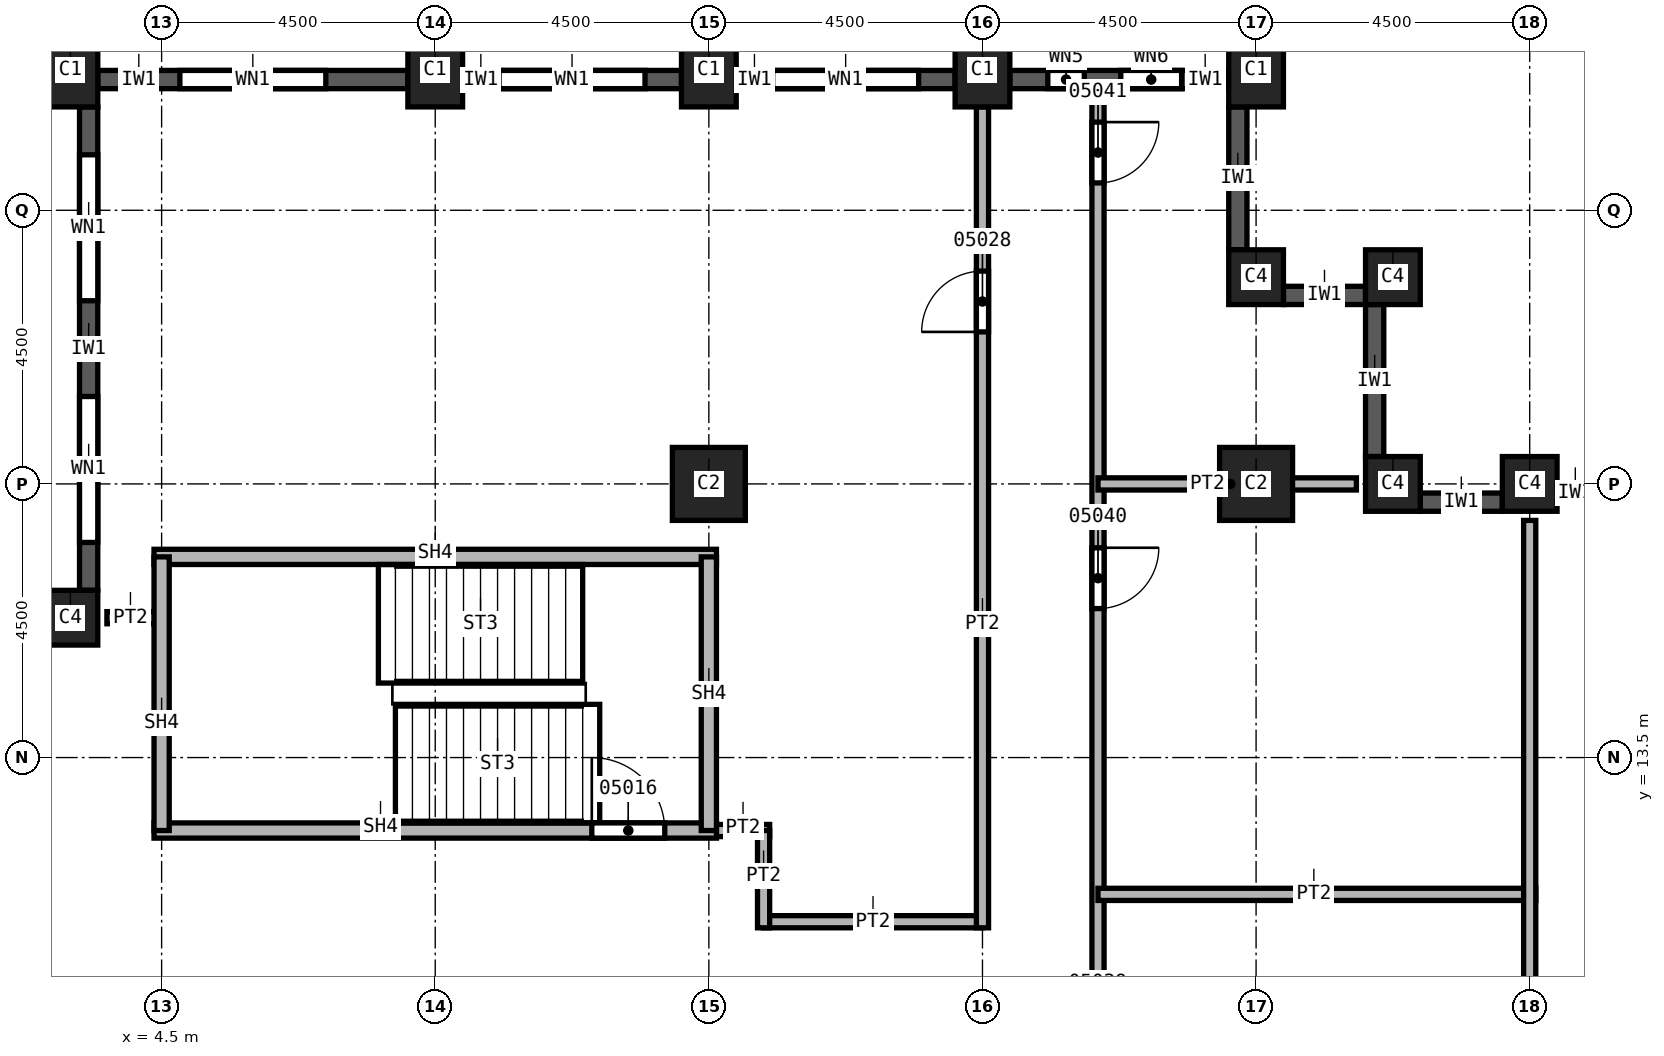
"""IFC4 building model, lengths in metres.
Left out: names, types, materials, properties, quantities, classifications, styles, units other than length and angle.
Written with IfcOpenShell. Run it as: python <this file> out.ifc"""

import sys

from ifc_helpers import new_model, si_unit, direction, frame, frame_2d, origin, origin_2d, place, context, subcontext, project, spatial, rectangle, extrude, element, fill, save


model = new_model("IFC4")
c1 = context("Model", 3, precision=1e-05, world=origin(), true_north=direction((0.0, 1.0)))
c2 = subcontext(c1, "Body", "Model", "MODEL_VIEW")
j1 = project(units=[si_unit("LENGTHUNIT", "METRE"), si_unit("PLANEANGLEUNIT", "RADIAN")], contexts=[c1])
p1 = place(None, origin())
s1 = spatial("IfcSite", under=j1, at=p1, CompositionType="ELEMENT")
p2 = place(p1, origin())
s2 = spatial("IfcBuilding", under=s1, at=p2, CompositionType="ELEMENT")
p3 = place(p2, frame((0.0, 0.0, 116.0)))
s3 = spatial("IfcBuildingStorey", under=s2, at=p3, CompositionType="ELEMENT", Elevation=116.0)
for number, where, z_axis, x_axis in (
    (1, (13.5, 18.0, 0.0), (0.0, 0.0, 1.0), (1.0, 0.0, 0.0)),
    (2, (22.5, 18.0, 0.0), (0.0, 0.0, 1.0), (1.0, 0.0, 0.0)),
):
    element("IfcColumn", number, at=place(p3, frame(where, z_axis=z_axis, x_axis=x_axis)), inside=s3, PredefinedType="COLUMN", context=c2, shape_type="SweptSolid", body=[
        extrude(rectangle(XDim=1.2, YDim=1.2, at=origin_2d()), origin(), (0.0, 0.0, 1.0), 3.6),
    ])
p4 = place(p3, frame((27.0, 18.0, 0.0), z_axis=(0.0, 0.0, 1.0), x_axis=(1.0, 0.0, 0.0)))
e3 = element("IfcColumn", 3, at=p4, inside=s3, PredefinedType="COLUMN", context=c2, shape_type="SweptSolid", body=[
    extrude(rectangle(XDim=0.9, YDim=0.9, at=origin_2d()), origin(), (0.0, 0.0, 1.0), 3.6),
])
for number, where, z_axis, x_axis in (
    (4, (3.0, 24.8, 0.0), (0.0, 0.0, 1.0), (1.0, 0.0, 0.0)),
    (5, (9.0, 24.8, 0.0), (0.0, 0.0, 1.0), (1.0, 0.0, 0.0)),
    (6, (13.5, 24.8, 0.0), (0.0, 0.0, 1.0), (1.0, 0.0, 0.0)),
    (7, (18.0, 24.8, 0.0), (0.0, 0.0, 1.0), (1.0, 0.0, 0.0)),
    (8, (22.5, 24.8, 0.0), (0.0, 0.0, 1.0), (1.0, 0.0, 0.0)),
):
    element("IfcColumn", number, at=place(p3, frame(where, z_axis=z_axis, x_axis=x_axis)), inside=s3, PredefinedType="COLUMN", context=c2, shape_type="SweptSolid", body=[
        extrude(rectangle(XDim=0.9, YDim=1.2, at=origin_2d()), origin(), (0.0, 0.0, 1.0), 3.6),
    ])
for number, where, z_axis, x_axis in (
    (9, (3.0, 15.8, 0.0), (0.0, 0.0, 1.0), (1.0, 0.0, 0.0)),
    (10, (22.5, 21.4, 0.0), (0.0, 0.0, 1.0), (1.0, 0.0, 0.0)),
    (11, (24.75, 21.4, 0.0), (0.0, 0.0, 1.0), (1.0, 0.0, 0.0)),
    (12, (24.75, 18.0, 0.0), (0.0, 0.0, 1.0), (1.0, 0.0, 0.0)),
):
    element("IfcColumn", number, at=place(p3, frame(where, z_axis=z_axis, x_axis=x_axis)), inside=s3, PredefinedType="COLUMN", context=c2, shape_type="SweptSolid", body=[
        extrude(rectangle(XDim=0.9, YDim=0.9, at=origin_2d()), origin(), (0.0, 0.0, 1.0), 3.6),
    ])
p5 = place(p3, frame((31.05, 17.85, 0.0), z_axis=(0.0, 0.0, 1.0), x_axis=(-1.0, 0.0, 0.0)))
e13 = element("IfcWall", 13, at=p5, inside=s3, PredefinedType="SOLIDWALL", context=c2, shape_type="SweptSolid", body=[
    extrude(rectangle(XDim=3.6, YDim=0.3, at=frame_2d((1.8, 0.0))), origin(), (0.0, 0.0, 1.0), 3.0),
])
p6 = place(p5, frame((0.6, 0.0, 0.8)))
e14 = element("IfcOpeningElement", 14, at=p6, cuts=e13, PredefinedType="OPENING", context=c2, shape_type="SweptSolid", body=[
    extrude(rectangle(XDim=2.4, YDim=1.95, at=frame_2d((1.2, 0.975))), frame((0.0, 0.15, 0.0), z_axis=(0.0, -1.0, 0.0), x_axis=(1.0, 0.0, 0.0)), (0.0, 0.0, 1.0), 0.3),
])
p7 = place(p3, frame((26.55, 17.7, 0.0), z_axis=(0.0, 0.0, 1.0), x_axis=(-1.0, 0.0, 0.0)))
e15 = element("IfcWall", 15, at=p7, inside=s3, PredefinedType="SOLIDWALL", context=c2, shape_type="SweptSolid", body=[
    extrude(rectangle(XDim=1.35, YDim=0.3, at=frame_2d((0.675, 0.0))), origin(), (0.0, 0.0, 1.0), 3.0),
])
p8 = place(p3, frame((24.45, 18.45, 0.0), z_axis=(0.0, 0.0, 1.0), x_axis=(0.0, 1.0, 0.0)))
e16 = element("IfcWall", 16, at=p8, inside=s3, PredefinedType="SOLIDWALL", context=c2, shape_type="SweptSolid", body=[
    extrude(rectangle(XDim=2.5, YDim=0.3, at=frame_2d((1.25, 0.0))), origin(), (0.0, 0.0, 1.0), 3.0),
])
p9 = place(p3, frame((24.3, 21.1, 0.0), z_axis=(0.0, 0.0, 1.0), x_axis=(-1.0, 0.0, 0.0)))
e17 = element("IfcWall", 17, at=p9, inside=s3, PredefinedType="SOLIDWALL", context=c2, shape_type="SweptSolid", body=[
    extrude(rectangle(XDim=1.35, YDim=0.3, at=frame_2d((0.675, 0.0))), origin(), (0.0, 0.0, 1.0), 3.0),
])
p10 = place(p3, frame((22.2, 21.85, 0.0), z_axis=(0.0, 0.0, 1.0), x_axis=(0.0, 1.0, 0.0)))
e18 = element("IfcWall", 18, at=p10, inside=s3, PredefinedType="SOLIDWALL", context=c2, shape_type="SweptSolid", body=[
    extrude(rectangle(XDim=2.35, YDim=0.3, at=frame_2d((1.175, 0.0))), origin(), (0.0, 0.0, 1.0), 3.0),
])
p11 = place(p3, frame((22.05, 24.65, 0.0), z_axis=(0.0, 0.0, 1.0), x_axis=(-1.0, 0.0, 0.0)))
e19 = element("IfcWall", 19, at=p11, inside=s3, PredefinedType="SOLIDWALL", context=c2, shape_type="SweptSolid", body=[
    extrude(rectangle(XDim=3.6, YDim=0.3, at=frame_2d((1.8, 0.0))), origin(), (0.0, 0.0, 1.0), 3.0),
])
p12 = place(p11, frame((0.775, 0.0, 0.8)))
e20 = element("IfcOpeningElement", 20, at=p12, cuts=e19, PredefinedType="OPENING", context=c2, shape_type="SweptSolid", body=[
    extrude(rectangle(XDim=1.0, YDim=1.95, at=frame_2d((0.5, 0.975))), frame((0.0, 0.15, 0.0), z_axis=(0.0, -1.0, 0.0), x_axis=(1.0, 0.0, 0.0)), (0.0, 0.0, 1.0), 0.3),
])
p13 = place(p11, frame((2.375, 0.0, 0.8)))
e21 = element("IfcOpeningElement", 21, at=p13, cuts=e19, PredefinedType="OPENING", context=c2, shape_type="SweptSolid", body=[
    extrude(rectangle(XDim=0.6, YDim=1.95, at=frame_2d((0.3, 0.975))), frame((0.0, 0.15, 0.0), z_axis=(0.0, -1.0, 0.0), x_axis=(1.0, 0.0, 0.0)), (0.0, 0.0, 1.0), 0.3),
])
p14 = place(p3, frame((17.55, 24.65, 0.0), z_axis=(0.0, 0.0, 1.0), x_axis=(-1.0, 0.0, 0.0)))
e22 = element("IfcWall", 22, at=p14, inside=s3, PredefinedType="SOLIDWALL", context=c2, shape_type="SweptSolid", body=[
    extrude(rectangle(XDim=3.6, YDim=0.3, at=frame_2d((1.8, 0.0))), origin(), (0.0, 0.0, 1.0), 3.0),
])
p15 = place(p14, frame((0.6, 0.0, 0.8)))
e23 = element("IfcOpeningElement", 23, at=p15, cuts=e22, PredefinedType="OPENING", context=c2, shape_type="SweptSolid", body=[
    extrude(rectangle(XDim=2.4, YDim=1.95, at=frame_2d((1.2, 0.975))), frame((0.0, 0.15, 0.0), z_axis=(0.0, -1.0, 0.0), x_axis=(1.0, 0.0, 0.0)), (0.0, 0.0, 1.0), 0.3),
])
p16 = place(p3, frame((13.05, 24.65, 0.0), z_axis=(0.0, 0.0, 1.0), x_axis=(-1.0, 0.0, 0.0)))
e24 = element("IfcWall", 24, at=p16, inside=s3, PredefinedType="SOLIDWALL", context=c2, shape_type="SweptSolid", body=[
    extrude(rectangle(XDim=3.6, YDim=0.3, at=frame_2d((1.8, 0.0))), origin(), (0.0, 0.0, 1.0), 3.0),
])
p17 = place(p16, frame((0.6, 0.0, 0.8)))
e25 = element("IfcOpeningElement", 25, at=p17, cuts=e24, PredefinedType="OPENING", context=c2, shape_type="SweptSolid", body=[
    extrude(rectangle(XDim=2.4, YDim=1.95, at=frame_2d((1.2, 0.975))), frame((0.0, 0.15, 0.0), z_axis=(0.0, -1.0, 0.0), x_axis=(1.0, 0.0, 0.0)), (0.0, 0.0, 1.0), 0.3),
])
p18 = place(p3, frame((8.55, 24.65, 0.0), z_axis=(0.0, 0.0, 1.0), x_axis=(-1.0, 0.0, 0.0)))
e26 = element("IfcWall", 26, at=p18, inside=s3, PredefinedType="SOLIDWALL", context=c2, shape_type="SweptSolid", body=[
    extrude(rectangle(XDim=5.1, YDim=0.3, at=frame_2d((2.55, 0.0))), origin(), (0.0, 0.0, 1.0), 3.0),
])
p19 = place(p18, frame((1.35, 0.0, 0.8)))
e27 = element("IfcOpeningElement", 27, at=p19, cuts=e26, PredefinedType="OPENING", context=c2, shape_type="SweptSolid", body=[
    extrude(rectangle(XDim=2.4, YDim=1.95, at=frame_2d((1.2, 0.975))), frame((0.0, 0.15, 0.0), z_axis=(0.0, -1.0, 0.0), x_axis=(1.0, 0.0, 0.0)), (0.0, 0.0, 1.0), 0.3),
])
p20 = place(p3, frame((3.3, 24.2, 0.0), z_axis=(0.0, 0.0, 1.0), x_axis=(0.0, -1.0, 0.0)))
e28 = element("IfcWall", 28, at=p20, inside=s3, PredefinedType="SOLIDWALL", context=c2, shape_type="SweptSolid", body=[
    extrude(rectangle(XDim=7.95, YDim=0.3, at=frame_2d((3.975, 0.0))), origin(), (0.0, 0.0, 1.0), 3.0),
])
p21 = place(p20, frame((0.788, 0.0, 0.8)))
e29 = element("IfcOpeningElement", 29, at=p21, cuts=e28, PredefinedType="OPENING", context=c2, shape_type="SweptSolid", body=[
    extrude(rectangle(XDim=2.4, YDim=1.95, at=frame_2d((1.2, 0.975))), frame((0.0, 0.15, 0.0), z_axis=(0.0, -1.0, 0.0), x_axis=(1.0, 0.0, 0.0)), (0.0, 0.0, 1.0), 0.3),
])
p22 = place(p20, frame((4.762, 0.0, 0.8)))
e30 = element("IfcOpeningElement", 30, at=p22, cuts=e28, PredefinedType="OPENING", context=c2, shape_type="SweptSolid", body=[
    extrude(rectangle(XDim=2.4, YDim=1.95, at=frame_2d((1.2, 0.975))), frame((0.0, 0.15, 0.0), z_axis=(0.0, -1.0, 0.0), x_axis=(1.0, 0.0, 0.0)), (0.0, 0.0, 1.0), 0.3),
])
p23 = place(p3, frame((3.6, 15.8, 0.0), z_axis=(0.0, 0.0, 1.0), x_axis=(1.0, 0.0, 0.0)))
e31 = element("IfcWall", 31, at=p23, inside=s3, PredefinedType="PARTITIONING", context=c2, shape_type="SweptSolid", body=[
    extrude(rectangle(XDim=0.9, YDim=0.2, at=frame_2d((0.45, 0.0))), origin(), (0.0, 0.0, 1.0), 3.6),
])
p24 = place(p3, frame((13.375, 12.3, 0.0), z_axis=(0.0, 0.0, 1.0), x_axis=(1.0, 0.0, 0.0)))
e32 = element("IfcWall", 32, at=p24, inside=s3, PredefinedType="PARTITIONING", context=c2, shape_type="SweptSolid", body=[
    extrude(rectangle(XDim=1.125, YDim=0.2, at=frame_2d((0.562, 0.0))), origin(), (0.0, 0.0, 1.0), 3.6),
])
p25 = place(p3, frame((14.4, 10.8, 0.0), z_axis=(0.0, 0.0, 1.0), x_axis=(1.0, 0.0, 0.0)))
e33 = element("IfcWall", 33, at=p25, inside=s3, PredefinedType="PARTITIONING", context=c2, shape_type="SweptSolid", body=[
    extrude(rectangle(XDim=3.6, YDim=0.2, at=frame_2d((1.8, 0.0))), origin(), (0.0, 0.0, 1.0), 3.6),
])
p26 = place(p3, frame((14.4, 12.3, 0.0), z_axis=(0.0, 0.0, 1.0), x_axis=(0.0, -1.0, 0.0)))
e34 = element("IfcWall", 34, at=p26, inside=s3, PredefinedType="PARTITIONING", context=c2, shape_type="SweptSolid", body=[
    extrude(rectangle(XDim=1.6, YDim=0.2, at=frame_2d((0.8, 0.0))), origin(), (0.0, 0.0, 1.0), 3.6),
])
p27 = place(p3, frame((18.0, 10.7, 0.0), z_axis=(0.0, 0.0, 1.0), x_axis=(0.0, 1.0, 0.0)))
e35 = element("IfcWall", 35, at=p27, inside=s3, PredefinedType="PARTITIONING", context=c2, shape_type="SweptSolid", body=[
    extrude(rectangle(XDim=13.5, YDim=0.2, at=frame_2d((6.75, 0.0))), origin(), (0.0, 0.0, 1.0), 3.6),
])
p28 = place(p27, frame((9.8, 0.0, 0.0)))
e36 = element("IfcOpeningElement", 36, at=p28, cuts=e35, PredefinedType="OPENING", context=c2, shape_type="SweptSolid", body=[
    extrude(rectangle(XDim=1.0, YDim=2.1, at=frame_2d((0.5, 1.05))), frame((0.0, 0.1, 0.0), z_axis=(0.0, -1.0, 0.0), x_axis=(1.0, 0.0, 0.0)), (0.0, 0.0, 1.0), 0.2),
])
p29 = place(p3, frame((19.9, 24.5, 0.0), z_axis=(0.0, 0.0, 1.0), x_axis=(0.0, -1.0, 0.0)))
e37 = element("IfcWall", 37, at=p29, inside=s3, PredefinedType="PARTITIONING", context=c2, shape_type="SweptSolid", body=[
    extrude(rectangle(XDim=25.35, YDim=0.2, at=frame_2d((12.675, 0.0))), origin(), (0.0, 0.0, 1.0), 3.6),
])
p30 = place(p29, frame((15.2, 0.0, 0.0)))
e38 = element("IfcOpeningElement", 38, at=p30, cuts=e37, PredefinedType="OPENING", context=c2, shape_type="SweptSolid", body=[
    extrude(rectangle(XDim=1.0, YDim=2.1, at=frame_2d((0.5, 1.05))), frame((0.0, 0.1, 0.0), z_axis=(0.0, -1.0, 0.0), x_axis=(1.0, 0.0, 0.0)), (0.0, 0.0, 1.0), 0.2),
])
p31 = place(p29, frame((7.55, 0.0, 0.0)))
e39 = element("IfcOpeningElement", 39, at=p31, cuts=e37, PredefinedType="OPENING", context=c2, shape_type="SweptSolid", body=[
    extrude(rectangle(XDim=1.0, YDim=2.1, at=frame_2d((0.5, 1.05))), frame((0.0, 0.1, 0.0), z_axis=(0.0, -1.0, 0.0), x_axis=(1.0, 0.0, 0.0)), (0.0, 0.0, 1.0), 0.2),
])
p32 = place(p29, frame((0.55, 0.0, 0.0)))
e40 = element("IfcOpeningElement", 40, at=p32, cuts=e37, PredefinedType="OPENING", context=c2, shape_type="SweptSolid", body=[
    extrude(rectangle(XDim=1.0, YDim=2.1, at=frame_2d((0.5, 1.05))), frame((0.0, 0.1, 0.0), z_axis=(0.0, -1.0, 0.0), x_axis=(1.0, 0.0, 0.0)), (0.0, 0.0, 1.0), 0.2),
])
p33 = place(p3, frame((19.9, 11.25, 0.0), z_axis=(0.0, 0.0, 1.0), x_axis=(1.0, 0.0, 0.0)))
e41 = element("IfcWall", 41, at=p33, inside=s3, PredefinedType="PARTITIONING", context=c2, shape_type="SweptSolid", body=[
    extrude(rectangle(XDim=7.2, YDim=0.2, at=frame_2d((3.6, 0.0))), origin(), (0.0, 0.0, 1.0), 3.6),
])
p34 = place(p3, frame((19.9, 18.0, 0.0), z_axis=(0.0, 0.0, 1.0), x_axis=(1.0, 0.0, 0.0)))
e42 = element("IfcWall", 42, at=p34, inside=s3, PredefinedType="PARTITIONING", context=c2, shape_type="SweptSolid", body=[
    extrude(rectangle(XDim=4.25, YDim=0.2, at=frame_2d((2.125, 0.0))), origin(), (0.0, 0.0, 1.0), 3.6),
])
p35 = place(p3, frame((27.0, 17.4, 0.0), z_axis=(0.0, 0.0, 1.0), x_axis=(0.0, -1.0, 0.0)))
e43 = element("IfcWall", 43, at=p35, inside=s3, PredefinedType="PARTITIONING", context=c2, shape_type="SweptSolid", body=[
    extrude(rectangle(XDim=18.15, YDim=0.2, at=frame_2d((9.075, 0.0))), origin(), (0.0, 0.0, 1.0), 3.6),
])
p36 = place(p3, frame((4.375, 12.3, 0.0), z_axis=(0.0, 0.0, 1.0), x_axis=(1.0, 0.0, 0.0)))
e44 = element("IfcWall", 44, at=p36, inside=s3, PredefinedType="SOLIDWALL", context=c2, shape_type="SweptSolid", body=[
    extrude(rectangle(XDim=9.25, YDim=0.25, at=frame_2d((4.625, 0.0))), origin(), (0.0, 0.0, 1.0), 3.6),
])
p37 = place(p36, frame((7.2, 0.0, 0.0)))
e45 = element("IfcOpeningElement", 45, at=p37, cuts=e44, PredefinedType="OPENING", context=c2, shape_type="SweptSolid", body=[
    extrude(rectangle(XDim=1.2, YDim=2.1, at=frame_2d((0.6, 1.05))), frame((0.0, 0.125, 0.0), z_axis=(0.0, -1.0, 0.0), x_axis=(1.0, 0.0, 0.0)), (0.0, 0.0, 1.0), 0.25),
])
p38 = place(p3, frame((4.375, 16.8, 0.0), z_axis=(0.0, 0.0, 1.0), x_axis=(1.0, 0.0, 0.0)))
e46 = element("IfcWall", 46, at=p38, inside=s3, PredefinedType="SOLIDWALL", context=c2, shape_type="SweptSolid", body=[
    extrude(rectangle(XDim=9.25, YDim=0.25, at=frame_2d((4.625, 0.0))), origin(), (0.0, 0.0, 1.0), 3.6),
])
for number, where, z_axis, x_axis in (
    (47, (4.5, 12.3, 0.0), (0.0, 0.0, 1.0), (0.0, 1.0, 0.0)),
    (48, (13.5, 16.8, 0.0), (0.0, 0.0, 1.0), (0.0, -1.0, 0.0)),
):
    element("IfcWall", number, at=place(p3, frame(where, z_axis=z_axis, x_axis=x_axis)), inside=s3, PredefinedType="SOLIDWALL", context=c2, shape_type="SweptSolid", body=[
        extrude(rectangle(XDim=4.5, YDim=0.25, at=frame_2d((2.25, 0.0))), origin(), (0.0, 0.0, 1.0), 3.6),
    ])
p39 = place(p15, origin())
e49 = element("IfcWindow", 49, at=p39, inside=s3, PartitioningType="SINGLE_PANEL", PredefinedType="WINDOW", context=c2, shape_type="SweptSolid", body=[
    extrude(rectangle(XDim=2.4, YDim=1.95, at=frame_2d((1.2, 0.975))), frame((0.0, 0.03, 0.0), z_axis=(0.0, -1.0, 0.0), x_axis=(1.0, 0.0, 0.0)), (0.0, 0.0, 1.0), 0.06),
])
fill(e23, e49)
p40 = place(p17, origin())
e50 = element("IfcWindow", 50, at=p40, inside=s3, PartitioningType="SINGLE_PANEL", PredefinedType="WINDOW", context=c2, shape_type="SweptSolid", body=[
    extrude(rectangle(XDim=2.4, YDim=1.95, at=frame_2d((1.2, 0.975))), frame((0.0, 0.03, 0.0), z_axis=(0.0, -1.0, 0.0), x_axis=(1.0, 0.0, 0.0)), (0.0, 0.0, 1.0), 0.06),
])
fill(e25, e50)
p41 = place(p19, origin())
e51 = element("IfcWindow", 51, at=p41, inside=s3, PartitioningType="SINGLE_PANEL", PredefinedType="WINDOW", context=c2, shape_type="SweptSolid", body=[
    extrude(rectangle(XDim=2.4, YDim=1.95, at=frame_2d((1.2, 0.975))), frame((0.0, 0.03, 0.0), z_axis=(0.0, -1.0, 0.0), x_axis=(1.0, 0.0, 0.0)), (0.0, 0.0, 1.0), 0.06),
])
fill(e27, e51)
p42 = place(p21, origin())
e52 = element("IfcWindow", 52, at=p42, inside=s3, PartitioningType="SINGLE_PANEL", PredefinedType="WINDOW", context=c2, shape_type="SweptSolid", body=[
    extrude(rectangle(XDim=2.4, YDim=1.95, at=frame_2d((1.2, 0.975))), frame((0.0, 0.03, 0.0), z_axis=(0.0, -1.0, 0.0), x_axis=(1.0, 0.0, 0.0)), (0.0, 0.0, 1.0), 0.06),
])
fill(e29, e52)
p43 = place(p22, origin())
e53 = element("IfcWindow", 53, at=p43, inside=s3, PartitioningType="SINGLE_PANEL", PredefinedType="WINDOW", context=c2, shape_type="SweptSolid", body=[
    extrude(rectangle(XDim=2.4, YDim=1.95, at=frame_2d((1.2, 0.975))), frame((0.0, 0.03, 0.0), z_axis=(0.0, -1.0, 0.0), x_axis=(1.0, 0.0, 0.0)), (0.0, 0.0, 1.0), 0.06),
])
fill(e30, e53)
p44 = place(p37, origin())
e54 = element("IfcDoor", 54, at=p44, inside=s3, OperationType="SINGLE_SWING_LEFT", PredefinedType="DOOR", context=c2, shape_type="SweptSolid", body=[
    extrude(rectangle(XDim=1.2, YDim=2.1, at=frame_2d((0.6, 1.05))), frame((0.0, 0.025, 0.0), z_axis=(0.0, -1.0, 0.0), x_axis=(1.0, 0.0, 0.0)), (0.0, 0.0, 1.0), 0.05),
])
fill(e45, e54)
p45 = place(p28, origin())
e55 = element("IfcDoor", 55, at=p45, inside=s3, OperationType="SINGLE_SWING_LEFT", PredefinedType="DOOR", context=c2, shape_type="SweptSolid", body=[
    extrude(rectangle(XDim=1.0, YDim=2.1, at=frame_2d((0.5, 1.05))), frame((0.0, 0.025, 0.0), z_axis=(0.0, -1.0, 0.0), x_axis=(1.0, 0.0, 0.0)), (0.0, 0.0, 1.0), 0.05),
])
fill(e36, e55)
p46 = place(p31, origin())
e56 = element("IfcDoor", 56, at=p46, inside=s3, OperationType="SINGLE_SWING_LEFT", PredefinedType="DOOR", context=c2, shape_type="SweptSolid", body=[
    extrude(rectangle(XDim=1.0, YDim=2.1, at=frame_2d((0.5, 1.05))), frame((0.0, 0.025, 0.0), z_axis=(0.0, -1.0, 0.0), x_axis=(1.0, 0.0, 0.0)), (0.0, 0.0, 1.0), 0.05),
])
fill(e39, e56)
p47 = place(p32, origin())
e57 = element("IfcDoor", 57, at=p47, inside=s3, OperationType="SINGLE_SWING_RIGHT", PredefinedType="DOOR", context=c2, shape_type="SweptSolid", body=[
    extrude(rectangle(XDim=1.0, YDim=2.1, at=frame_2d((0.5, 1.05))), frame((0.0, 0.025, 0.0), z_axis=(0.0, -1.0, 0.0), x_axis=(1.0, 0.0, 0.0)), (0.0, 0.0, 1.0), 0.05),
])
fill(e40, e57)
p48 = place(p12, origin())
e58 = element("IfcWindow", 58, at=p48, inside=s3, PartitioningType="SINGLE_PANEL", PredefinedType="WINDOW", context=c2, shape_type="SweptSolid", body=[
    extrude(rectangle(XDim=1.0, YDim=1.95, at=frame_2d((0.5, 0.975))), frame((0.0, 0.03, 0.0), z_axis=(0.0, -1.0, 0.0), x_axis=(1.0, 0.0, 0.0)), (0.0, 0.0, 1.0), 0.06),
])
fill(e20, e58)
p49 = place(p13, origin())
e59 = element("IfcWindow", 59, at=p49, inside=s3, PartitioningType="SINGLE_PANEL", PredefinedType="WINDOW", context=c2, shape_type="SweptSolid", body=[
    extrude(rectangle(XDim=0.6, YDim=1.95, at=frame_2d((0.3, 0.975))), frame((0.0, 0.03, 0.0), z_axis=(0.0, -1.0, 0.0), x_axis=(1.0, 0.0, 0.0)), (0.0, 0.0, 1.0), 0.06),
])
fill(e21, e59)
save(model, sys.argv[1])
